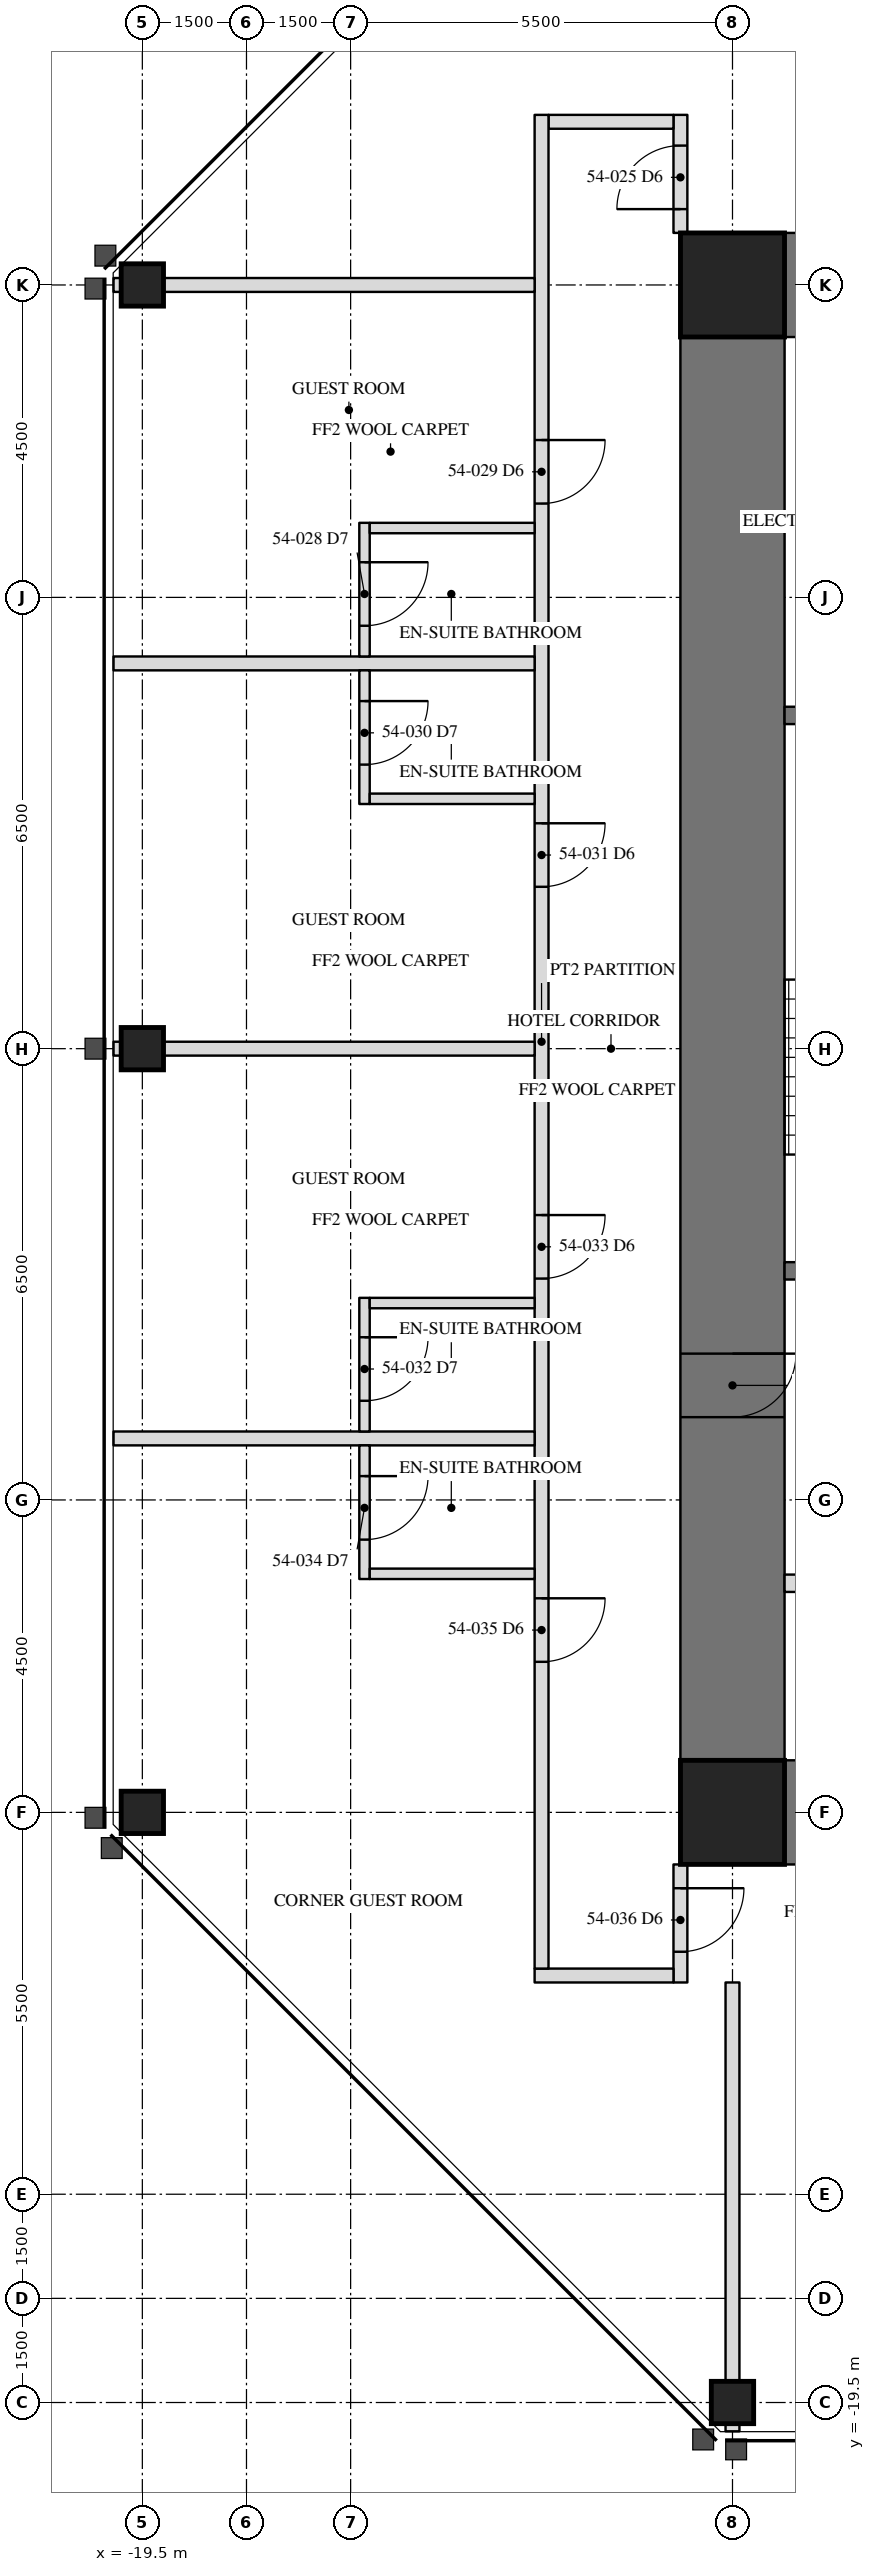
"""IFC4 building model, lengths in metres.
Left out: names, types, materials, properties, quantities, classifications, styles, units other than length and angle.
Written with IfcOpenShell. Run it as: python <this file> out.ifc"""

import sys

from ifc_helpers import new_model, si_unit, direction, frame, frame_2d, origin, origin_2d, place, context, subcontext, project, spatial, rectangle, hollow_rectangle, extrude, element, fill, save


model = new_model("IFC4")
c1 = context("Model", 3, precision=1e-05, world=origin(), true_north=direction((0.0, 1.0)))
c2 = subcontext(c1, "Body", "Model", "MODEL_VIEW")
j1 = project(units=[si_unit("LENGTHUNIT", "METRE"), si_unit("PLANEANGLEUNIT", "RADIAN")], contexts=[c1])
p1 = place(None, origin())
s1 = spatial("IfcSite", under=j1, at=p1, CompositionType="ELEMENT")
p2 = place(p1, origin())
s2 = spatial("IfcBuilding", under=s1, at=p2, CompositionType="ELEMENT")
p3 = place(p2, frame((0.0, 0.0, 225.7)))
s3 = spatial("IfcBuildingStorey", under=s2, at=p3, CompositionType="ELEMENT", Elevation=225.7)
for number, where, z_axis, x_axis in (
    (1, (-19.5, 0.0, 0.0), (0.0, 0.0, 1.0), (0.0, 1.0, 0.0)),
    (2, (-19.5, -11.0, 0.0), (0.0, 0.0, 1.0), (0.0, 1.0, 0.0)),
    (3, (-11.0, -19.5, 0.0), (0.0, 0.0, 1.0), (1.0, 0.0, 0.0)),
    (4, (-19.5, 11.0, 0.0), (0.0, 0.0, 1.0), (0.0, 1.0, 0.0)),
):
    element("IfcColumn", number, at=place(p3, frame(where, z_axis=z_axis, x_axis=x_axis)), inside=s3, PredefinedType="COLUMN", context=c2, shape_type="SweptSolid", body=[
        extrude(hollow_rectangle(XDim=0.61, YDim=0.61, WallThickness=0.076, at=origin_2d()), origin(), (0.0, 0.0, 1.0), 3.5),
    ])
p4 = place(p3, frame((-11.0, 11.0, 0.0), z_axis=(0.0, 0.0, 1.0), x_axis=(0.0, -1.0, 0.0)))
e5 = element("IfcWall", 5, at=p4, inside=s3, PredefinedType="SHEAR", context=c2, shape_type="SweptSolid", body=[
    extrude(rectangle(XDim=22.0, YDim=1.5, at=frame_2d((11.0, 0.0))), origin(), (0.0, 0.0, 1.0), 3.5),
])
p5 = place(p4, frame((15.393, 0.0, 0.0)))
e6 = element("IfcOpeningElement", 6, at=p5, cuts=e5, PredefinedType="OPENING", context=c2, shape_type="SweptSolid", body=[
    extrude(rectangle(XDim=0.915, YDim=2.134, at=frame_2d((0.458, 1.067))), frame((0.0, 0.76, 0.0), z_axis=(0.0, -1.0, 0.0), x_axis=(1.0, 0.0, 0.0)), (0.0, 0.0, 1.0), 1.52),
])
for number, where, z_axis, x_axis in (
    (7, (-6.5, 11.0, 0.0), (0.0, 0.0, 1.0), (-1.0, 0.0, 0.0)),
    (8, (-11.0, -11.0, 0.0), (0.0, 0.0, 1.0), (1.0, 0.0, 0.0)),
):
    element("IfcWall", number, at=place(p3, frame(where, z_axis=z_axis, x_axis=x_axis)), inside=s3, PredefinedType="SHEAR", context=c2, shape_type="SweptSolid", body=[
        extrude(rectangle(XDim=4.5, YDim=1.5, at=frame_2d((2.25, 0.0))), origin(), (0.0, 0.0, 1.0), 3.5),
    ])
for number, where, z_axis, x_axis in (
    (9, (-11.0, 11.0, 0.0), (0.0, 0.0, 1.0), (1.0, 0.0, 0.0)),
    (10, (-11.0, -11.0, 0.0), (0.0, 0.0, 1.0), (1.0, 0.0, 0.0)),
):
    element("IfcColumn", number, at=place(p3, frame(where, z_axis=z_axis, x_axis=x_axis)), inside=s3, PredefinedType="COLUMN", context=c2, shape_type="SweptSolid", body=[
        extrude(hollow_rectangle(XDim=1.499, YDim=1.499, WallThickness=0.102, at=origin_2d()), origin(), (0.0, 0.0, 1.0), 3.5),
    ])
p6 = place(p3, frame((-6.95, 4.8, 0.0), z_axis=(0.0, 0.0, 1.0), x_axis=(-1.0, 0.0, 0.0)))
e11 = element("IfcWall", 11, at=p6, inside=s3, PredefinedType="SOLIDWALL", context=c2, shape_type="SweptSolid", body=[
    extrude(rectangle(XDim=3.3, YDim=0.25, at=frame_2d((1.65, 0.0))), origin(), (0.0, 0.0, 1.0), 3.31),
])
p7 = place(p3, frame((-6.95, -3.2, 0.0), z_axis=(0.0, 0.0, 1.0), x_axis=(-1.0, 0.0, 0.0)))
e12 = element("IfcWall", 12, at=p7, inside=s3, PredefinedType="SOLIDWALL", context=c2, shape_type="SweptSolid", body=[
    extrude(rectangle(XDim=3.3, YDim=0.25, at=frame_2d((1.65, 0.0))), origin(), (0.0, 0.0, 1.0), 3.31),
])
p8 = place(p7, frame((1.116, 0.0, 0.0)))
e13 = element("IfcOpeningElement", 13, at=p8, cuts=e12, PredefinedType="OPENING", context=c2, shape_type="SweptSolid", body=[
    extrude(rectangle(XDim=1.067, YDim=2.134, at=frame_2d((0.533, 1.067))), frame((0.0, 0.135, 0.0), z_axis=(0.0, -1.0, 0.0), x_axis=(1.0, 0.0, 0.0)), (0.0, 0.0, 1.0), 0.27),
])
p9 = place(p3, frame((-6.95, -7.7, 0.0), z_axis=(0.0, 0.0, 1.0), x_axis=(-1.0, 0.0, 0.0)))
e14 = element("IfcWall", 14, at=p9, inside=s3, PredefinedType="PARTITIONING", context=c2, shape_type="SweptSolid", body=[
    extrude(rectangle(XDim=3.3, YDim=0.25, at=frame_2d((1.65, 0.0))), origin(), (0.0, 0.0, 1.0), 3.31),
])
p10 = place(p9, frame((0.45, 0.0, 0.0)))
e15 = element("IfcOpeningElement", 15, at=p10, cuts=e14, PredefinedType="OPENING", context=c2, shape_type="SweptSolid", body=[
    extrude(rectangle(XDim=1.219, YDim=2.134, at=frame_2d((0.609, 1.067))), frame((0.0, 0.135, 0.0), z_axis=(0.0, -1.0, 0.0), x_axis=(1.0, 0.0, 0.0)), (0.0, 0.0, 1.0), 0.27),
])
p11 = place(p3, frame((-11.75, 11.75, 0.0), z_axis=(0.0, 0.0, 1.0), x_axis=(0.0, 1.0, 0.0)))
e16 = element("IfcWall", 16, at=p11, inside=s3, PredefinedType="PARTITIONING", context=c2, shape_type="SweptSolid", body=[
    extrude(rectangle(XDim=1.7, YDim=0.2, at=frame_2d((0.85, 0.0))), origin(), (0.0, 0.0, 1.0), 3.31),
])
p12 = place(p11, frame((0.343, 0.0, 0.0)))
e17 = element("IfcOpeningElement", 17, at=p12, cuts=e16, PredefinedType="OPENING", context=c2, shape_type="SweptSolid", body=[
    extrude(rectangle(XDim=0.915, YDim=2.134, at=frame_2d((0.458, 1.067))), frame((0.0, 0.11, 0.0), z_axis=(0.0, -1.0, 0.0), x_axis=(1.0, 0.0, 0.0)), (0.0, 0.0, 1.0), 0.22),
])
p13 = place(p3, frame((-11.85, 13.35, 0.0), z_axis=(0.0, 0.0, 1.0), x_axis=(-1.0, 0.0, 0.0)))
e18 = element("IfcWall", 18, at=p13, inside=s3, PredefinedType="PARTITIONING", context=c2, shape_type="SweptSolid", body=[
    extrude(rectangle(XDim=1.8, YDim=0.2, at=frame_2d((0.9, 0.0))), origin(), (0.0, 0.0, 1.0), 3.31),
])
p14 = place(p3, frame((-11.75, -11.75, 0.0), z_axis=(0.0, 0.0, 1.0), x_axis=(0.0, -1.0, 0.0)))
e19 = element("IfcWall", 19, at=p14, inside=s3, PredefinedType="PARTITIONING", context=c2, shape_type="SweptSolid", body=[
    extrude(rectangle(XDim=1.7, YDim=0.2, at=frame_2d((0.85, 0.0))), origin(), (0.0, 0.0, 1.0), 3.31),
])
p15 = place(p14, frame((0.343, 0.0, 0.0)))
e20 = element("IfcOpeningElement", 20, at=p15, cuts=e19, PredefinedType="OPENING", context=c2, shape_type="SweptSolid", body=[
    extrude(rectangle(XDim=0.915, YDim=2.134, at=frame_2d((0.458, 1.067))), frame((0.0, 0.11, 0.0), z_axis=(0.0, -1.0, 0.0), x_axis=(1.0, 0.0, 0.0)), (0.0, 0.0, 1.0), 0.22),
])
p16 = place(p3, frame((-13.85, -13.35, 0.0), z_axis=(0.0, 0.0, 1.0), x_axis=(1.0, 0.0, 0.0)))
e21 = element("IfcWall", 21, at=p16, inside=s3, PredefinedType="PARTITIONING", context=c2, shape_type="SweptSolid", body=[
    extrude(rectangle(XDim=2.0, YDim=0.2, at=frame_2d((1.0, 0.0))), origin(), (0.0, 0.0, 1.0), 3.31),
])
p17 = place(p3, frame((-13.75, 13.45, 0.0), z_axis=(0.0, 0.0, 1.0), x_axis=(0.0, -1.0, 0.0)))
e22 = element("IfcWall", 22, at=p17, inside=s3, PredefinedType="PARTITIONING", context=c2, shape_type="SweptSolid", body=[
    extrude(rectangle(XDim=26.7, YDim=0.2, at=frame_2d((13.35, 0.0))), origin(), (0.0, 0.0, 1.0), 3.31),
])
p18 = place(p17, frame((4.684, 0.0, 0.0)))
e23 = element("IfcOpeningElement", 23, at=p18, cuts=e22, PredefinedType="OPENING", context=c2, shape_type="SweptSolid", body=[
    extrude(rectangle(XDim=0.915, YDim=2.134, at=frame_2d((0.458, 1.067))), frame((0.0, 0.11, 0.0), z_axis=(0.0, -1.0, 0.0), x_axis=(1.0, 0.0, 0.0)), (0.0, 0.0, 1.0), 0.22),
])
p19 = place(p17, frame((10.204, 0.0, 0.0)))
e24 = element("IfcOpeningElement", 24, at=p19, cuts=e22, PredefinedType="OPENING", context=c2, shape_type="SweptSolid", body=[
    extrude(rectangle(XDim=0.915, YDim=2.134, at=frame_2d((0.458, 1.067))), frame((0.0, 0.11, 0.0), z_axis=(0.0, -1.0, 0.0), x_axis=(1.0, 0.0, 0.0)), (0.0, 0.0, 1.0), 0.22),
])
p20 = place(p17, frame((15.846, 0.0, 0.0)))
e25 = element("IfcOpeningElement", 25, at=p20, cuts=e22, PredefinedType="OPENING", context=c2, shape_type="SweptSolid", body=[
    extrude(rectangle(XDim=0.915, YDim=2.134, at=frame_2d((0.458, 1.067))), frame((0.0, 0.11, 0.0), z_axis=(0.0, -1.0, 0.0), x_axis=(1.0, 0.0, 0.0)), (0.0, 0.0, 1.0), 0.22),
])
p21 = place(p17, frame((21.366, 0.0, 0.0)))
e26 = element("IfcOpeningElement", 26, at=p21, cuts=e22, PredefinedType="OPENING", context=c2, shape_type="SweptSolid", body=[
    extrude(rectangle(XDim=0.915, YDim=2.134, at=frame_2d((0.458, 1.067))), frame((0.0, 0.11, 0.0), z_axis=(0.0, -1.0, 0.0), x_axis=(1.0, 0.0, 0.0)), (0.0, 0.0, 1.0), 0.22),
])
p22 = place(p3, frame((-13.85, 11.0, 0.0), z_axis=(0.0, 0.0, 1.0), x_axis=(-1.0, 0.0, 0.0)))
e27 = element("IfcWall", 27, at=p22, inside=s3, PredefinedType="PARTITIONING", context=c2, shape_type="SweptSolid", body=[
    extrude(rectangle(XDim=6.065, YDim=0.2, at=frame_2d((3.032, 0.0))), origin(), (0.0, 0.0, 1.0), 2.802),
])
p23 = place(p3, frame((-13.85, 5.549, 0.0), z_axis=(0.0, 0.0, 1.0), x_axis=(-1.0, 0.0, 0.0)))
e28 = element("IfcWall", 28, at=p23, inside=s3, PredefinedType="PARTITIONING", context=c2, shape_type="SweptSolid", body=[
    extrude(rectangle(XDim=6.065, YDim=0.2, at=frame_2d((3.032, 0.0))), origin(), (0.0, 0.0, 1.0), 3.31),
])
p24 = place(p3, frame((-13.85, 0.0, 0.0), z_axis=(0.0, 0.0, 1.0), x_axis=(-1.0, 0.0, 0.0)))
e29 = element("IfcWall", 29, at=p24, inside=s3, PredefinedType="PARTITIONING", context=c2, shape_type="SweptSolid", body=[
    extrude(rectangle(XDim=6.065, YDim=0.2, at=frame_2d((3.032, 0.0))), origin(), (0.0, 0.0, 1.0), 2.802),
])
p25 = place(p3, frame((-13.85, -5.614, 0.0), z_axis=(0.0, 0.0, 1.0), x_axis=(-1.0, 0.0, 0.0)))
e30 = element("IfcWall", 30, at=p25, inside=s3, PredefinedType="PARTITIONING", context=c2, shape_type="SweptSolid", body=[
    extrude(rectangle(XDim=6.065, YDim=0.2, at=frame_2d((3.032, 0.0))), origin(), (0.0, 0.0, 1.0), 3.31),
])
p26 = place(p3, frame((-16.3, 7.574, 0.0), z_axis=(0.0, 0.0, 1.0), x_axis=(0.0, -1.0, 0.0)))
e31 = element("IfcWall", 31, at=p26, inside=s3, PredefinedType="PARTITIONING", context=c2, shape_type="SweptSolid", body=[
    extrude(rectangle(XDim=1.925, YDim=0.15, at=frame_2d((0.962, 0.0))), origin(), (0.0, 0.0, 1.0), 3.31),
])
p27 = place(p26, frame((0.567, 0.0, 0.0)))
e32 = element("IfcOpeningElement", 32, at=p27, cuts=e31, PredefinedType="OPENING", context=c2, shape_type="SweptSolid", body=[
    extrude(rectangle(XDim=0.915, YDim=2.032, at=frame_2d((0.458, 1.016))), frame((0.0, 0.085, 0.0), z_axis=(0.0, -1.0, 0.0), x_axis=(1.0, 0.0, 0.0)), (0.0, 0.0, 1.0), 0.17),
])
p28 = place(p3, frame((-13.85, 7.499, 0.0), z_axis=(0.0, 0.0, 1.0), x_axis=(-1.0, 0.0, 0.0)))
e33 = element("IfcWall", 33, at=p28, inside=s3, PredefinedType="PARTITIONING", context=c2, shape_type="SweptSolid", body=[
    extrude(rectangle(XDim=2.375, YDim=0.15, at=frame_2d((1.188, 0.0))), origin(), (0.0, 0.0, 1.0), 3.31),
])
p29 = place(p3, frame((-16.3, 5.449, 0.0), z_axis=(0.0, 0.0, 1.0), x_axis=(0.0, -1.0, 0.0)))
e34 = element("IfcWall", 34, at=p29, inside=s3, PredefinedType="PARTITIONING", context=c2, shape_type="SweptSolid", body=[
    extrude(rectangle(XDim=1.925, YDim=0.15, at=frame_2d((0.962, 0.0))), origin(), (0.0, 0.0, 1.0), 3.31),
])
p30 = place(p29, frame((0.442, 0.0, 0.0)))
e35 = element("IfcOpeningElement", 35, at=p30, cuts=e34, PredefinedType="OPENING", context=c2, shape_type="SweptSolid", body=[
    extrude(rectangle(XDim=0.915, YDim=2.032, at=frame_2d((0.458, 1.016))), frame((0.0, 0.085, 0.0), z_axis=(0.0, -1.0, 0.0), x_axis=(1.0, 0.0, 0.0)), (0.0, 0.0, 1.0), 0.17),
])
p31 = place(p3, frame((-13.85, 3.599, 0.0), z_axis=(0.0, 0.0, 1.0), x_axis=(-1.0, 0.0, 0.0)))
e36 = element("IfcWall", 36, at=p31, inside=s3, PredefinedType="PARTITIONING", context=c2, shape_type="SweptSolid", body=[
    extrude(rectangle(XDim=2.375, YDim=0.15, at=frame_2d((1.188, 0.0))), origin(), (0.0, 0.0, 1.0), 2.703),
])
p32 = place(p3, frame((-16.3, -3.589, 0.0), z_axis=(0.0, 0.0, 1.0), x_axis=(0.0, -1.0, 0.0)))
e37 = element("IfcWall", 37, at=p32, inside=s3, PredefinedType="PARTITIONING", context=c2, shape_type="SweptSolid", body=[
    extrude(rectangle(XDim=1.925, YDim=0.15, at=frame_2d((0.962, 0.0))), origin(), (0.0, 0.0, 1.0), 3.31),
])
p33 = place(p32, frame((0.567, 0.0, 0.0)))
e38 = element("IfcOpeningElement", 38, at=p33, cuts=e37, PredefinedType="OPENING", context=c2, shape_type="SweptSolid", body=[
    extrude(rectangle(XDim=0.915, YDim=2.032, at=frame_2d((0.458, 1.016))), frame((0.0, 0.085, 0.0), z_axis=(0.0, -1.0, 0.0), x_axis=(1.0, 0.0, 0.0)), (0.0, 0.0, 1.0), 0.17),
])
p34 = place(p3, frame((-13.85, -3.664, 0.0), z_axis=(0.0, 0.0, 1.0), x_axis=(-1.0, 0.0, 0.0)))
e39 = element("IfcWall", 39, at=p34, inside=s3, PredefinedType="PARTITIONING", context=c2, shape_type="SweptSolid", body=[
    extrude(rectangle(XDim=2.375, YDim=0.15, at=frame_2d((1.188, 0.0))), origin(), (0.0, 0.0, 1.0), 2.703),
])
p35 = place(p3, frame((-16.3, -5.714, 0.0), z_axis=(0.0, 0.0, 1.0), x_axis=(0.0, -1.0, 0.0)))
e40 = element("IfcWall", 40, at=p35, inside=s3, PredefinedType="PARTITIONING", context=c2, shape_type="SweptSolid", body=[
    extrude(rectangle(XDim=1.925, YDim=0.15, at=frame_2d((0.962, 0.0))), origin(), (0.0, 0.0, 1.0), 3.31),
])
p36 = place(p35, frame((0.442, 0.0, 0.0)))
e41 = element("IfcOpeningElement", 41, at=p36, cuts=e40, PredefinedType="OPENING", context=c2, shape_type="SweptSolid", body=[
    extrude(rectangle(XDim=0.915, YDim=2.032, at=frame_2d((0.458, 1.016))), frame((0.0, 0.085, 0.0), z_axis=(0.0, -1.0, 0.0), x_axis=(1.0, 0.0, 0.0)), (0.0, 0.0, 1.0), 0.17),
])
p37 = place(p3, frame((-13.85, -7.564, 0.0), z_axis=(0.0, 0.0, 1.0), x_axis=(-1.0, 0.0, 0.0)))
e42 = element("IfcWall", 42, at=p37, inside=s3, PredefinedType="PARTITIONING", context=c2, shape_type="SweptSolid", body=[
    extrude(rectangle(XDim=2.375, YDim=0.15, at=frame_2d((1.188, 0.0))), origin(), (0.0, 0.0, 1.0), 3.31),
])
p38 = place(p3, frame((-11.0, -13.45, 0.0), z_axis=(0.0, 0.0, 1.0), x_axis=(0.0, -1.0, 0.0)))
e43 = element("IfcWall", 43, at=p38, inside=s3, PredefinedType="PARTITIONING", context=c2, shape_type="SweptSolid", body=[
    extrude(rectangle(XDim=6.465, YDim=0.2, at=frame_2d((3.232, 0.0))), origin(), (0.0, 0.0, 1.0), 2.802),
])
p39 = place(p5, origin())
e44 = element("IfcDoor", 44, at=p39, inside=s3, OperationType="SINGLE_SWING_RIGHT", PredefinedType="DOOR", context=c2, shape_type="SweptSolid", body=[
    extrude(rectangle(XDim=0.915, YDim=2.134, at=frame_2d((0.458, 1.067))), frame((0.0, -0.675, 0.0), z_axis=(0.0, -1.0, 0.0), x_axis=(1.0, 0.0, 0.0)), (0.0, 0.0, 1.0), 0.05),
])
fill(e6, e44)
p40 = place(p12, origin())
e45 = element("IfcDoor", 45, at=p40, inside=s3, OperationType="SINGLE_SWING_LEFT", PredefinedType="DOOR", context=c2, shape_type="SweptSolid", body=[
    extrude(rectangle(XDim=0.915, YDim=2.134, at=frame_2d((0.458, 1.067))), frame((0.0, 0.025, 0.0), z_axis=(0.0, -1.0, 0.0), x_axis=(1.0, 0.0, 0.0)), (0.0, 0.0, 1.0), 0.05),
])
fill(e17, e45)
p41 = place(p27, origin())
e46 = element("IfcDoor", 46, at=p41, inside=s3, OperationType="SINGLE_SWING_LEFT", PredefinedType="DOOR", context=c2, shape_type="SweptSolid", body=[
    extrude(rectangle(XDim=0.915, YDim=2.032, at=frame_2d((0.458, 1.016))), frame((0.0, 0.025, 0.0), z_axis=(0.0, -1.0, 0.0), x_axis=(1.0, 0.0, 0.0)), (0.0, 0.0, 1.0), 0.05),
])
fill(e32, e46)
p42 = place(p18, origin())
e47 = element("IfcDoor", 47, at=p42, inside=s3, OperationType="SINGLE_SWING_LEFT", PredefinedType="DOOR", context=c2, shape_type="SweptSolid", body=[
    extrude(rectangle(XDim=0.915, YDim=2.134, at=frame_2d((0.458, 1.067))), frame((0.0, 0.025, 0.0), z_axis=(0.0, -1.0, 0.0), x_axis=(1.0, 0.0, 0.0)), (0.0, 0.0, 1.0), 0.05),
])
fill(e23, e47)
p43 = place(p30, origin())
e48 = element("IfcDoor", 48, at=p43, inside=s3, OperationType="SINGLE_SWING_LEFT", PredefinedType="DOOR", context=c2, shape_type="SweptSolid", body=[
    extrude(rectangle(XDim=0.915, YDim=2.032, at=frame_2d((0.458, 1.016))), frame((0.0, 0.025, 0.0), z_axis=(0.0, -1.0, 0.0), x_axis=(1.0, 0.0, 0.0)), (0.0, 0.0, 1.0), 0.05),
])
fill(e35, e48)
p44 = place(p19, origin())
e49 = element("IfcDoor", 49, at=p44, inside=s3, OperationType="SINGLE_SWING_LEFT", PredefinedType="DOOR", context=c2, shape_type="SweptSolid", body=[
    extrude(rectangle(XDim=0.915, YDim=2.134, at=frame_2d((0.458, 1.067))), frame((0.0, 0.025, 0.0), z_axis=(0.0, -1.0, 0.0), x_axis=(1.0, 0.0, 0.0)), (0.0, 0.0, 1.0), 0.05),
])
fill(e24, e49)
p45 = place(p33, origin())
e50 = element("IfcDoor", 50, at=p45, inside=s3, OperationType="SINGLE_SWING_LEFT", PredefinedType="DOOR", context=c2, shape_type="SweptSolid", body=[
    extrude(rectangle(XDim=0.915, YDim=2.032, at=frame_2d((0.458, 1.016))), frame((0.0, 0.025, 0.0), z_axis=(0.0, -1.0, 0.0), x_axis=(1.0, 0.0, 0.0)), (0.0, 0.0, 1.0), 0.05),
])
fill(e38, e50)
p46 = place(p20, origin())
e51 = element("IfcDoor", 51, at=p46, inside=s3, OperationType="SINGLE_SWING_LEFT", PredefinedType="DOOR", context=c2, shape_type="SweptSolid", body=[
    extrude(rectangle(XDim=0.915, YDim=2.134, at=frame_2d((0.458, 1.067))), frame((0.0, 0.025, 0.0), z_axis=(0.0, -1.0, 0.0), x_axis=(1.0, 0.0, 0.0)), (0.0, 0.0, 1.0), 0.05),
])
fill(e25, e51)
p47 = place(p36, origin())
e52 = element("IfcDoor", 52, at=p47, inside=s3, OperationType="SINGLE_SWING_LEFT", PredefinedType="DOOR", context=c2, shape_type="SweptSolid", body=[
    extrude(rectangle(XDim=0.915, YDim=2.032, at=frame_2d((0.458, 1.016))), frame((0.0, 0.025, 0.0), z_axis=(0.0, -1.0, 0.0), x_axis=(1.0, 0.0, 0.0)), (0.0, 0.0, 1.0), 0.05),
])
fill(e41, e52)
p48 = place(p21, origin())
e53 = element("IfcDoor", 53, at=p48, inside=s3, OperationType="SINGLE_SWING_LEFT", PredefinedType="DOOR", context=c2, shape_type="SweptSolid", body=[
    extrude(rectangle(XDim=0.915, YDim=2.134, at=frame_2d((0.458, 1.067))), frame((0.0, 0.025, 0.0), z_axis=(0.0, -1.0, 0.0), x_axis=(1.0, 0.0, 0.0)), (0.0, 0.0, 1.0), 0.05),
])
fill(e26, e53)
p49 = place(p15, origin())
e54 = element("IfcDoor", 54, at=p49, inside=s3, OperationType="SINGLE_SWING_LEFT", PredefinedType="DOOR", context=c2, shape_type="SweptSolid", body=[
    extrude(rectangle(XDim=0.915, YDim=2.134, at=frame_2d((0.458, 1.067))), frame((0.0, 0.025, 0.0), z_axis=(0.0, -1.0, 0.0), x_axis=(1.0, 0.0, 0.0)), (0.0, 0.0, 1.0), 0.05),
])
fill(e20, e54)
save(model, sys.argv[1])
